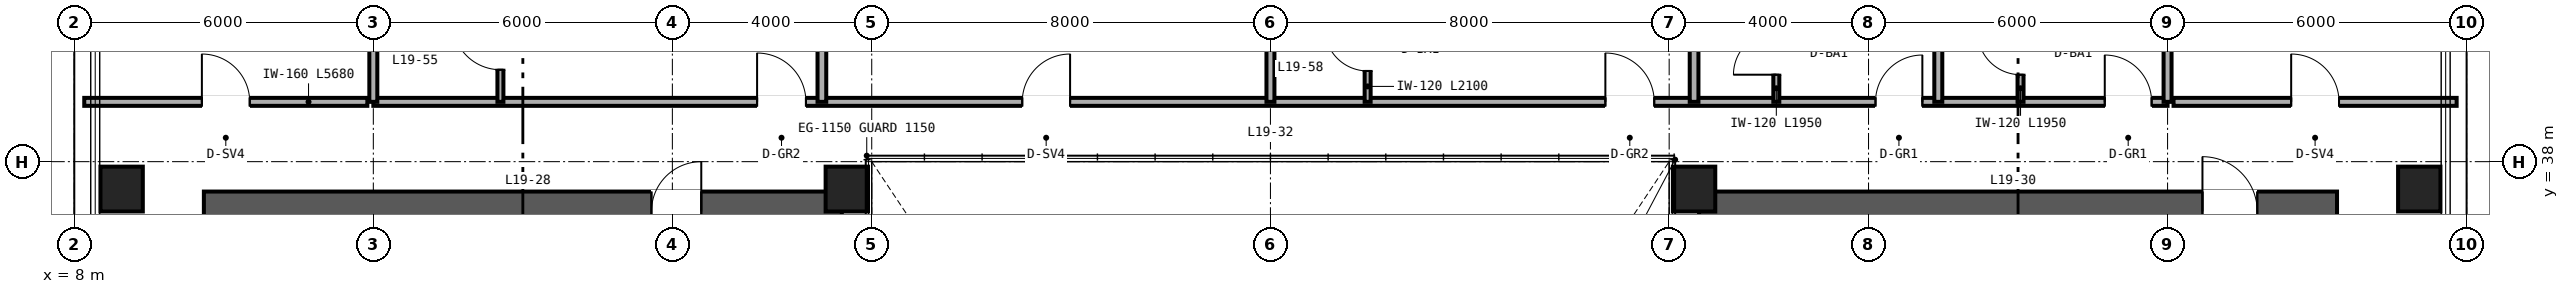
"""IFC4 building model, lengths in metres.
Left out: names, types, materials, properties, quantities, classifications, styles, units other than length and angle.
Written with IfcOpenShell. Run it as: python <this file> out.ifc"""

import sys

from ifc_helpers import new_model, si_unit, direction, frame, frame_2d, origin, origin_2d, place, context, subcontext, project, spatial, rectangle, hollow_rectangle, extrude, source, transform, mapped, element, fill, save


model = new_model("IFC4")
c1 = context("Model", 3, precision=1e-05, world=origin(), true_north=direction((0.0, 1.0)))
c2 = subcontext(c1, "Body", "Model", "MODEL_VIEW")
j1 = project(units=[si_unit("LENGTHUNIT", "METRE"), si_unit("PLANEANGLEUNIT", "RADIAN")], contexts=[c1])
p1 = place(None, origin())
s1 = spatial("IfcSite", under=j1, at=p1, CompositionType="ELEMENT")
p2 = place(p1, origin())
s2 = spatial("IfcBuilding", under=s1, at=p2, CompositionType="ELEMENT")
p3 = place(p2, frame((0.0, 0.0, 78.0)))
s3 = spatial("IfcBuildingStorey", under=s2, at=p3, CompositionType="ELEMENT", Elevation=78.0)
p4 = place(p3, frame((10.6, 37.0, 0.0), z_axis=(0.0, 0.0, 1.0), x_axis=(1.0, 0.0, 0.0)))
e1 = element("IfcWall", 1, at=p4, inside=s3, PredefinedType="SHEAR", context=c2, shape_type="SweptSolid", body=[
    extrude(rectangle(XDim=12.8, YDim=0.8, at=frame_2d((6.4, 0.0))), origin(), (0.0, 0.0, 1.0), 3.35),
])
p5 = place(p4, frame((8.98, 0.0, 0.0)))
e2 = element("IfcOpeningElement", 2, at=p5, cuts=e1, PredefinedType="OPENING", context=c2, shape_type="SweptSolid", body=[
    extrude(rectangle(XDim=1.0, YDim=2.15, at=frame_2d((0.5, 1.075))), frame((0.0, 0.41, 0.0), z_axis=(0.0, -1.0, 0.0), x_axis=(1.0, 0.0, 0.0)), (0.0, 0.0, 1.0), 0.82),
])
p6 = place(p3, frame((40.6, 37.0, 0.0), z_axis=(0.0, 0.0, 1.0), x_axis=(1.0, 0.0, 0.0)))
e3 = element("IfcWall", 3, at=p6, inside=s3, PredefinedType="SHEAR", context=c2, shape_type="SweptSolid", body=[
    extrude(rectangle(XDim=12.8, YDim=0.8, at=frame_2d((6.4, 0.0))), origin(), (0.0, 0.0, 1.0), 3.35),
])
p7 = place(p6, frame((10.1, 0.0, 0.0)))
e4 = element("IfcOpeningElement", 4, at=p7, cuts=e3, PredefinedType="OPENING", context=c2, shape_type="SweptSolid", body=[
    extrude(rectangle(XDim=1.1, YDim=2.15, at=frame_2d((0.55, 1.075))), frame((0.0, 0.41, 0.0), z_axis=(0.0, -1.0, 0.0), x_axis=(1.0, 0.0, 0.0)), (0.0, 0.0, 1.0), 0.82),
])
m1 = source(origin(), c2, "Body", "SweptSolid", [
    extrude(hollow_rectangle(XDim=0.85, YDim=0.9, WallThickness=0.04, at=origin_2d()), origin(), (0.0, 0.0, 1.0), 3.35),
])
for number, where, z_axis, x_axis in (
    (5, (8.95, 37.45, 0.0), (0.0, 0.0, 1.0), (1.0, 0.0, 0.0)),
    (6, (23.5, 37.45, 0.0), (0.0, 0.0, 1.0), (1.0, 0.0, 0.0)),
    (7, (40.5, 37.45, 0.0), (0.0, 0.0, 1.0), (1.0, 0.0, 0.0)),
    (8, (55.05, 37.45, 0.0), (0.0, 0.0, 1.0), (1.0, 0.0, 0.0)),
):
    element("IfcColumn", number, at=place(p3, frame(where, z_axis=z_axis, x_axis=x_axis)), inside=s3, PredefinedType="COLUMN", context=c2, shape_type="MappedRepresentation", body=[
        mapped(m1, transform((0.0, 0.0, 0.0), scale=1.0)),
    ])
p8 = place(p3, frame((8.2, 39.2, 0.0), z_axis=(0.0, 0.0, 1.0), x_axis=(1.0, 0.0, 0.0)))
e9 = element("IfcWall", 9, at=p8, inside=s3, PredefinedType="PARTITIONING", context=c2, shape_type="SweptSolid", body=[
    extrude(rectangle(XDim=5.68, YDim=0.16, at=frame_2d((2.84, 0.0))), origin(), (0.0, 0.0, 1.0), 3.35),
])
p9 = place(p8, frame((2.36, 0.0, 0.0)))
e10 = element("IfcOpeningElement", 10, at=p9, cuts=e9, PredefinedType="OPENING", context=c2, shape_type="SweptSolid", body=[
    extrude(rectangle(XDim=0.96, YDim=2.15, at=frame_2d((0.48, 1.075))), frame((0.0, 0.09, 0.0), z_axis=(0.0, -1.0, 0.0), x_axis=(1.0, 0.0, 0.0)), (0.0, 0.0, 1.0), 0.18),
])
p10 = place(p3, frame((50.12, 39.2, 0.0), z_axis=(0.0, 0.0, 1.0), x_axis=(1.0, 0.0, 0.0)))
e11 = element("IfcWall", 11, at=p10, inside=s3, PredefinedType="PARTITIONING", context=c2, shape_type="SweptSolid", body=[
    extrude(rectangle(XDim=5.68, YDim=0.16, at=frame_2d((2.84, 0.0))), origin(), (0.0, 0.0, 1.0), 3.35),
])
p11 = place(p10, frame((2.36, 0.0, 0.0)))
e12 = element("IfcOpeningElement", 12, at=p11, cuts=e11, PredefinedType="OPENING", context=c2, shape_type="SweptSolid", body=[
    extrude(rectangle(XDim=0.96, YDim=2.15, at=frame_2d((0.48, 1.075))), frame((0.0, 0.09, 0.0), z_axis=(0.0, -1.0, 0.0), x_axis=(1.0, 0.0, 0.0)), (0.0, 0.0, 1.0), 0.18),
])
p12 = place(p3, frame((14.0, 39.2, 0.0), z_axis=(0.0, 0.0, 1.0), x_axis=(1.0, 0.0, 0.0)))
e13 = element("IfcWall", 13, at=p12, inside=s3, PredefinedType="PARTITIONING", context=c2, shape_type="SweptSolid", body=[
    extrude(rectangle(XDim=36.0, YDim=0.16, at=frame_2d((18.0, 0.0))), origin(), (0.0, 0.0, 1.0), 2.571),
])
p13 = place(p12, frame((7.7, 0.0, 0.0)))
e14 = element("IfcOpeningElement", 14, at=p13, cuts=e13, PredefinedType="OPENING", context=c2, shape_type="SweptSolid", body=[
    extrude(rectangle(XDim=0.98, YDim=2.2, at=frame_2d((0.49, 1.1))), frame((0.0, 0.09, 0.0), z_axis=(0.0, -1.0, 0.0), x_axis=(1.0, 0.0, 0.0)), (0.0, 0.0, 1.0), 0.18),
])
p14 = place(p12, frame((13.02, 0.0, 0.0)))
e15 = element("IfcOpeningElement", 15, at=p14, cuts=e13, PredefinedType="OPENING", context=c2, shape_type="SweptSolid", body=[
    extrude(rectangle(XDim=0.96, YDim=2.15, at=frame_2d((0.48, 1.075))), frame((0.0, 0.09, 0.0), z_axis=(0.0, -1.0, 0.0), x_axis=(1.0, 0.0, 0.0)), (0.0, 0.0, 1.0), 0.18),
])
p15 = place(p12, frame((24.72, 0.0, 0.0)))
e16 = element("IfcOpeningElement", 16, at=p15, cuts=e13, PredefinedType="OPENING", context=c2, shape_type="SweptSolid", body=[
    extrude(rectangle(XDim=0.98, YDim=2.2, at=frame_2d((0.49, 1.1))), frame((0.0, 0.09, 0.0), z_axis=(0.0, -1.0, 0.0), x_axis=(1.0, 0.0, 0.0)), (0.0, 0.0, 1.0), 0.18),
])
p16 = place(p12, frame((30.14, 0.0, 0.0)))
e17 = element("IfcOpeningElement", 17, at=p16, cuts=e13, PredefinedType="OPENING", context=c2, shape_type="SweptSolid", body=[
    extrude(rectangle(XDim=0.94, YDim=2.15, at=frame_2d((0.47, 1.075))), frame((0.0, 0.09, 0.0), z_axis=(0.0, -1.0, 0.0), x_axis=(1.0, 0.0, 0.0)), (0.0, 0.0, 1.0), 0.18),
])
p17 = place(p12, frame((34.74, 0.0, 0.0)))
e18 = element("IfcOpeningElement", 18, at=p17, cuts=e13, PredefinedType="OPENING", context=c2, shape_type="SweptSolid", body=[
    extrude(rectangle(XDim=0.94, YDim=2.15, at=frame_2d((0.47, 1.075))), frame((0.0, 0.09, 0.0), z_axis=(0.0, -1.0, 0.0), x_axis=(1.0, 0.0, 0.0)), (0.0, 0.0, 1.0), 0.18),
])
for number, where, z_axis, x_axis in (
    (19, (14.0, 39.2, 0.0), (0.0, 0.0, 1.0), (0.0, 1.0, 0.0)),
    (20, (50.0, 39.2, 0.0), (0.0, 0.0, 1.0), (0.0, 1.0, 0.0)),
):
    element("IfcWall", number, at=place(p3, frame(where, z_axis=z_axis, x_axis=x_axis)), inside=s3, PredefinedType="PARTITIONING", context=c2, shape_type="SweptSolid", body=[
        extrude(rectangle(XDim=10.44, YDim=0.16, at=frame_2d((5.22, 0.0))), origin(), (0.0, 0.0, 1.0), 2.657),
    ])
p18 = place(p3, frame((23.0, 39.2, 0.0), z_axis=(0.0, 0.0, 1.0), x_axis=(0.0, 1.0, 0.0)))
e21 = element("IfcWall", 21, at=p18, inside=s3, PredefinedType="PARTITIONING", context=c2, shape_type="SweptSolid", body=[
    extrude(rectangle(XDim=10.44, YDim=0.175, at=frame_2d((5.22, 0.0))), origin(), (0.0, 0.0, 1.0), 2.813),
])
p19 = place(p3, frame((16.55, 39.2, 0.0), z_axis=(0.0, 0.0, 1.0), x_axis=(0.0, 1.0, 0.0)))
e22 = element("IfcWall", 22, at=p19, inside=s3, PredefinedType="PARTITIONING", context=c2, shape_type="SweptSolid", body=[
    extrude(rectangle(XDim=2.25, YDim=0.12, at=frame_2d((1.125, 0.0))), origin(), (0.0, 0.0, 1.0), 3.35),
])
p20 = place(p19, frame((0.645, 0.0, 0.0)))
e23 = element("IfcOpeningElement", 23, at=p20, cuts=e22, PredefinedType="OPENING", context=c2, shape_type="SweptSolid", body=[
    extrude(rectangle(XDim=0.96, YDim=2.15, at=frame_2d((0.48, 1.075))), frame((0.0, 0.07, 0.0), z_axis=(0.0, -1.0, 0.0), x_axis=(1.0, 0.0, 0.0)), (0.0, 0.0, 1.0), 0.14),
])
p21 = place(p3, frame((32.0, 39.2, 0.0), z_axis=(0.0, 0.0, 1.0), x_axis=(0.0, 1.0, 0.0)))
e24 = element("IfcWall", 24, at=p21, inside=s3, PredefinedType="PARTITIONING", context=c2, shape_type="SweptSolid", body=[
    extrude(rectangle(XDim=10.44, YDim=0.16, at=frame_2d((5.22, 0.0))), origin(), (0.0, 0.0, 1.0), 2.423),
])
p22 = place(p3, frame((40.5, 39.2, 0.0), z_axis=(0.0, 0.0, 1.0), x_axis=(0.0, 1.0, 0.0)))
e25 = element("IfcWall", 25, at=p22, inside=s3, PredefinedType="PARTITIONING", context=c2, shape_type="SweptSolid", body=[
    extrude(rectangle(XDim=10.44, YDim=0.175, at=frame_2d((5.22, 0.0))), origin(), (0.0, 0.0, 1.0), 2.423),
])
p23 = place(p3, frame((33.95, 39.2, 0.0), z_axis=(0.0, 0.0, 1.0), x_axis=(0.0, 1.0, 0.0)))
e26 = element("IfcWall", 26, at=p23, inside=s3, PredefinedType="PARTITIONING", context=c2, shape_type="SweptSolid", body=[
    extrude(rectangle(XDim=2.1, YDim=0.12, at=frame_2d((1.05, 0.0))), origin(), (0.0, 0.0, 1.0), 3.35),
])
p24 = place(p23, frame((0.62, 0.0, 0.0)))
e27 = element("IfcOpeningElement", 27, at=p24, cuts=e26, PredefinedType="OPENING", context=c2, shape_type="SweptSolid", body=[
    extrude(rectangle(XDim=0.86, YDim=2.1, at=frame_2d((0.43, 1.05))), frame((0.0, 0.07, 0.0), z_axis=(0.0, -1.0, 0.0), x_axis=(1.0, 0.0, 0.0)), (0.0, 0.0, 1.0), 0.14),
])
p25 = place(p3, frame((45.4, 39.2, 0.0), z_axis=(0.0, 0.0, 1.0), x_axis=(0.0, 1.0, 0.0)))
e28 = element("IfcWall", 28, at=p25, inside=s3, PredefinedType="PARTITIONING", context=c2, shape_type="SweptSolid", body=[
    extrude(rectangle(XDim=10.44, YDim=0.16, at=frame_2d((5.22, 0.0))), origin(), (0.0, 0.0, 1.0), 2.657),
])
p26 = place(p3, frame((42.15, 39.2, 0.0), z_axis=(0.0, 0.0, 1.0), x_axis=(0.0, 1.0, 0.0)))
e29 = element("IfcWall", 29, at=p26, inside=s3, PredefinedType="PARTITIONING", context=c2, shape_type="SweptSolid", body=[
    extrude(rectangle(XDim=1.95, YDim=0.12, at=frame_2d((0.975, 0.0))), origin(), (0.0, 0.0, 1.0), 3.35),
])
p27 = place(p26, frame((0.545, 0.0, 0.0)))
e30 = element("IfcOpeningElement", 30, at=p27, cuts=e29, PredefinedType="OPENING", context=c2, shape_type="SweptSolid", body=[
    extrude(rectangle(XDim=0.86, YDim=2.1, at=frame_2d((0.43, 1.05))), frame((0.0, 0.07, 0.0), z_axis=(0.0, -1.0, 0.0), x_axis=(1.0, 0.0, 0.0)), (0.0, 0.0, 1.0), 0.14),
])
p28 = place(p3, frame((47.05, 39.2, 0.0), z_axis=(0.0, 0.0, 1.0), x_axis=(0.0, 1.0, 0.0)))
e31 = element("IfcWall", 31, at=p28, inside=s3, PredefinedType="PARTITIONING", context=c2, shape_type="SweptSolid", body=[
    extrude(rectangle(XDim=1.95, YDim=0.12, at=frame_2d((0.975, 0.0))), origin(), (0.0, 0.0, 1.0), 3.35),
])
p29 = place(p28, frame((0.545, 0.0, 0.0)))
e32 = element("IfcOpeningElement", 32, at=p29, cuts=e31, PredefinedType="OPENING", context=c2, shape_type="SweptSolid", body=[
    extrude(rectangle(XDim=0.86, YDim=2.1, at=frame_2d((0.43, 1.05))), frame((0.0, 0.07, 0.0), z_axis=(0.0, -1.0, 0.0), x_axis=(1.0, 0.0, 0.0)), (0.0, 0.0, 1.0), 0.14),
])
m2 = source(origin(), c2, "Body", "SweptSolid", [
    extrude(rectangle(XDim=1.0, YDim=2.15, at=frame_2d((0.5, 1.075))), frame((0.0, 0.025, 0.0), z_axis=(0.0, -1.0, 0.0), x_axis=(1.0, 0.0, 0.0)), (0.0, 0.0, 1.0), 0.05),
])
p30 = place(p5, origin())
e33 = element("IfcDoor", 33, at=p30, inside=s3, OperationType="SINGLE_SWING_RIGHT", PredefinedType="DOOR", context=c2, shape_type="MappedRepresentation", body=[
    mapped(m2, transform((0.0, 0.0, 0.0), scale=1.0)),
])
fill(e2, e33)
m3 = source(origin(), c2, "Body", "SweptSolid", [
    extrude(rectangle(XDim=1.1, YDim=2.15, at=frame_2d((0.55, 1.075))), frame((0.0, 0.025, 0.0), z_axis=(0.0, -1.0, 0.0), x_axis=(1.0, 0.0, 0.0)), (0.0, 0.0, 1.0), 0.05),
])
p31 = place(p7, origin())
e34 = element("IfcDoor", 34, at=p31, inside=s3, OperationType="SINGLE_SWING_LEFT", PredefinedType="DOOR", context=c2, shape_type="MappedRepresentation", body=[
    mapped(m3, transform((0.0, 0.0, 0.0), scale=1.0)),
])
fill(e4, e34)
m4 = source(origin(), c2, "Body", "SweptSolid", [
    extrude(rectangle(XDim=0.96, YDim=2.15, at=frame_2d((0.48, 1.075))), frame((0.0, 0.025, 0.0), z_axis=(0.0, -1.0, 0.0), x_axis=(1.0, 0.0, 0.0)), (0.0, 0.0, 1.0), 0.05),
])
p32 = place(p9, origin())
e35 = element("IfcDoor", 35, at=p32, inside=s3, OperationType="SINGLE_SWING_LEFT", PredefinedType="DOOR", context=c2, shape_type="MappedRepresentation", body=[
    mapped(m4, transform((0.0, 0.0, 0.0), scale=1.0)),
])
fill(e10, e35)
p33 = place(p11, origin())
e36 = element("IfcDoor", 36, at=p33, inside=s3, OperationType="SINGLE_SWING_LEFT", PredefinedType="DOOR", context=c2, shape_type="MappedRepresentation", body=[
    mapped(m4, transform((0.0, 0.0, 0.0), scale=1.0)),
])
fill(e12, e36)
p34 = place(p20, origin())
e37 = element("IfcDoor", 37, at=p34, inside=s3, OperationType="SINGLE_SWING_RIGHT", PredefinedType="DOOR", context=c2, shape_type="MappedRepresentation", body=[
    mapped(m4, transform((0.0, 0.0, 0.0), scale=1.0)),
])
fill(e23, e37)
m5 = source(origin(), c2, "Body", "SweptSolid", [
    extrude(rectangle(XDim=0.86, YDim=2.1, at=frame_2d((0.43, 1.05))), frame((0.0, 0.025, 0.0), z_axis=(0.0, -1.0, 0.0), x_axis=(1.0, 0.0, 0.0)), (0.0, 0.0, 1.0), 0.05),
])
p35 = place(p24, origin())
e38 = element("IfcDoor", 38, at=p35, inside=s3, OperationType="SINGLE_SWING_RIGHT", PredefinedType="DOOR", context=c2, shape_type="MappedRepresentation", body=[
    mapped(m5, transform((0.0, 0.0, 0.0), scale=1.0)),
])
fill(e27, e38)
p36 = place(p27, origin())
e39 = element("IfcDoor", 39, at=p36, inside=s3, OperationType="SINGLE_SWING_LEFT", PredefinedType="DOOR", context=c2, shape_type="MappedRepresentation", body=[
    mapped(m5, transform((0.0, 0.0, 0.0), scale=1.0)),
])
fill(e30, e39)
p37 = place(p29, origin())
e40 = element("IfcDoor", 40, at=p37, inside=s3, OperationType="SINGLE_SWING_RIGHT", PredefinedType="DOOR", context=c2, shape_type="MappedRepresentation", body=[
    mapped(m5, transform((0.0, 0.0, 0.0), scale=1.0)),
])
fill(e32, e40)
m6 = source(origin(), c2, "Body", "SweptSolid", [
    extrude(rectangle(XDim=0.98, YDim=2.2, at=frame_2d((0.49, 1.1))), frame((0.0, 0.025, 0.0), z_axis=(0.0, -1.0, 0.0), x_axis=(1.0, 0.0, 0.0)), (0.0, 0.0, 1.0), 0.05),
])
p38 = place(p13, origin())
e41 = element("IfcDoor", 41, at=p38, inside=s3, OperationType="SINGLE_SWING_LEFT", PredefinedType="DOOR", context=c2, shape_type="MappedRepresentation", body=[
    mapped(m6, transform((0.0, 0.0, 0.0), scale=1.0)),
])
fill(e14, e41)
p39 = place(p14, origin())
e42 = element("IfcDoor", 42, at=p39, inside=s3, OperationType="SINGLE_SWING_RIGHT", PredefinedType="DOOR", context=c2, shape_type="MappedRepresentation", body=[
    mapped(m4, transform((0.0, 0.0, 0.0), scale=1.0)),
])
fill(e15, e42)
p40 = place(p15, origin())
e43 = element("IfcDoor", 43, at=p40, inside=s3, OperationType="SINGLE_SWING_LEFT", PredefinedType="DOOR", context=c2, shape_type="MappedRepresentation", body=[
    mapped(m6, transform((0.0, 0.0, 0.0), scale=1.0)),
])
fill(e16, e43)
m7 = source(origin(), c2, "Body", "SweptSolid", [
    extrude(rectangle(XDim=0.94, YDim=2.15, at=frame_2d((0.47, 1.075))), frame((0.0, 0.025, 0.0), z_axis=(0.0, -1.0, 0.0), x_axis=(1.0, 0.0, 0.0)), (0.0, 0.0, 1.0), 0.05),
])
p41 = place(p16, origin())
e44 = element("IfcDoor", 44, at=p41, inside=s3, OperationType="SINGLE_SWING_RIGHT", PredefinedType="DOOR", context=c2, shape_type="MappedRepresentation", body=[
    mapped(m7, transform((0.0, 0.0, 0.0), scale=1.0)),
])
fill(e17, e44)
p42 = place(p17, origin())
e45 = element("IfcDoor", 45, at=p42, inside=s3, OperationType="SINGLE_SWING_LEFT", PredefinedType="DOOR", context=c2, shape_type="MappedRepresentation", body=[
    mapped(m7, transform((0.0, 0.0, 0.0), scale=1.0)),
])
fill(e18, e45)
save(model, sys.argv[1])
